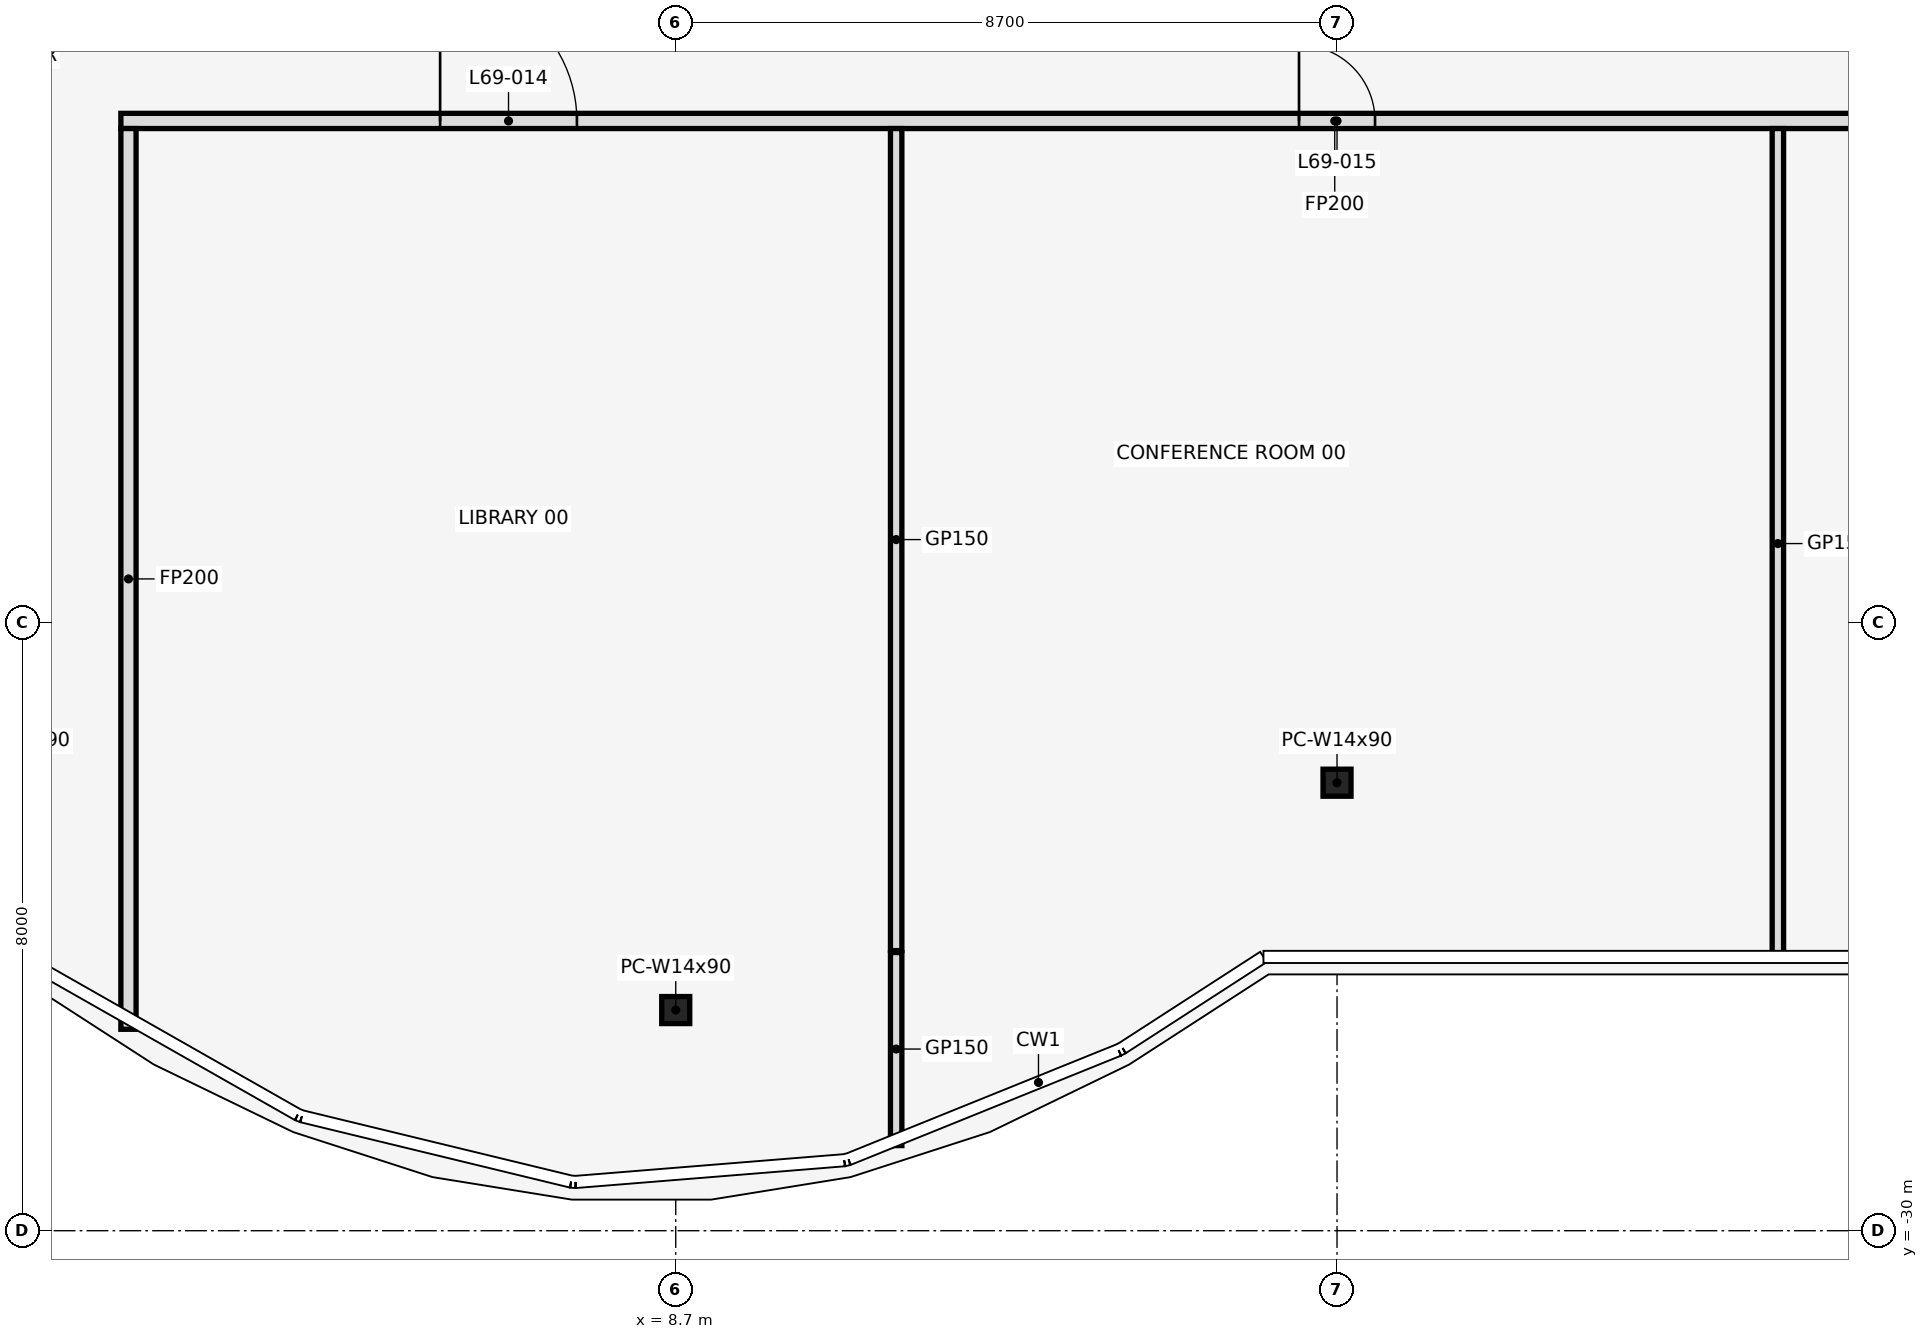
"""IFC4 building model, lengths in metres.
Left out: names, types, materials, properties, quantities, classifications, styles, units other than length and angle.
Written with IfcOpenShell. Run it as: python <this file> out.ifc"""

import sys

from ifc_helpers import new_model, si_unit, direction, frame, frame_2d, origin, origin_2d, place, context, subcontext, project, spatial, rectangle, i_section, extrude, element, fill, save


model = new_model("IFC4")
c1 = context("Model", 3, precision=1e-05, world=origin(), true_north=direction((0.0, 1.0)))
c2 = subcontext(c1, "Body", "Model", "MODEL_VIEW")
j1 = project(units=[si_unit("LENGTHUNIT", "METRE"), si_unit("PLANEANGLEUNIT", "RADIAN")], contexts=[c1])
p1 = place(None, origin())
s1 = spatial("IfcSite", under=j1, at=p1, CompositionType="ELEMENT")
p2 = place(p1, origin())
s2 = spatial("IfcBuilding", under=s1, at=p2, CompositionType="ELEMENT")
p3 = place(p2, frame((0.0, 0.0, 306.5)))
s3 = spatial("IfcBuildingStorey", under=s2, at=p3, CompositionType="ELEMENT", Elevation=306.5)
for number, where, z_axis, x_axis in (
    (1, (8.7, -27.097, 0.0), (0.0, 0.0, 1.0), (1.0, 0.0, 0.0)),
    (2, (17.4, -24.106, 0.0), (0.0, 0.0, 1.0), (1.0, 0.0, 0.0)),
):
    element("IfcColumn", number, at=place(p3, frame(where, z_axis=z_axis, x_axis=x_axis)), inside=s3, PredefinedType="COLUMN", context=c2, shape_type="SweptSolid", body=[
        extrude(i_section(OverallWidth=0.368, OverallDepth=0.356, WebThickness=0.011, FlangeThickness=0.018, at=origin_2d()), origin(), (0.0, 0.0, 1.0), 4.5),
    ])
p4 = place(p3, frame((1.4, -15.4, 0.0), z_axis=(0.0, 0.0, 1.0), x_axis=(1.0, 0.0, 0.0)))
e3 = element("IfcWall", 3, at=p4, inside=s3, PredefinedType="PARTITIONING", context=c2, shape_type="SweptSolid", body=[
    extrude(rectangle(XDim=31.94, YDim=0.2, at=frame_2d((15.97, 0.0))), origin(), (0.0, 0.0, 1.0), 3.418),
])
p5 = place(p4, frame((4.2, 0.0, 0.0)))
e4 = element("IfcOpeningElement", 4, at=p5, cuts=e3, PredefinedType="OPENING", context=c2, shape_type="SweptSolid", body=[
    extrude(rectangle(XDim=1.8, YDim=2.1, at=frame_2d((0.9, 1.05))), frame((0.0, 0.112, 0.0), z_axis=(0.0, -1.0, 0.0), x_axis=(1.0, 0.0, 0.0)), (0.0, 0.0, 1.0), 0.224),
])
p6 = place(p4, frame((15.5, 0.0, 0.0)))
e5 = element("IfcOpeningElement", 5, at=p6, cuts=e3, PredefinedType="OPENING", context=c2, shape_type="SweptSolid", body=[
    extrude(rectangle(XDim=1.0, YDim=2.1, at=frame_2d((0.5, 1.05))), frame((0.0, 0.112, 0.0), z_axis=(0.0, -1.0, 0.0), x_axis=(1.0, 0.0, 0.0)), (0.0, 0.0, 1.0), 0.224),
])
p7 = place(p4, frame((26.4, 0.0, 0.0)))
e6 = element("IfcOpeningElement", 6, at=p7, cuts=e3, PredefinedType="OPENING", context=c2, shape_type="SweptSolid", body=[
    extrude(rectangle(XDim=1.0, YDim=2.1, at=frame_2d((0.5, 1.05))), frame((0.0, 0.112, 0.0), z_axis=(0.0, -1.0, 0.0), x_axis=(1.0, 0.0, 0.0)), (0.0, 0.0, 1.0), 0.224),
])
p8 = place(p3, frame((1.5, -27.35, 0.0), z_axis=(0.0, 0.0, 1.0), x_axis=(0.0, 1.0, 0.0)))
e7 = element("IfcWall", 7, at=p8, inside=s3, PredefinedType="PARTITIONING", context=c2, shape_type="SweptSolid", body=[
    extrude(rectangle(XDim=11.85, YDim=0.2, at=frame_2d((5.925, 0.0))), origin(), (0.0, 0.0, 1.0), 3.418),
])
p9 = place(p3, frame((11.6, -28.88, 0.0), z_axis=(0.0, 0.0, 1.0), x_axis=(0.0, 1.0, 0.0)))
e8 = element("IfcWall", 8, at=p9, inside=s3, PredefinedType="PARTITIONING", context=c2, shape_type="SweptSolid", body=[
    extrude(rectangle(XDim=2.54, YDim=0.15, at=frame_2d((1.27, 0.0))), origin(), (0.0, 0.0, 1.0), 3.418),
])
p10 = place(p3, frame((11.6, -26.315, 0.0), z_axis=(0.0, 0.0, 1.0), x_axis=(0.0, 1.0, 0.0)))
e9 = element("IfcWall", 9, at=p10, inside=s3, PredefinedType="PARTITIONING", context=c2, shape_type="SweptSolid", body=[
    extrude(rectangle(XDim=10.815, YDim=0.15, at=frame_2d((5.408, 0.0))), origin(), (0.0, 0.0, 1.0), 3.418),
])
p11 = place(p3, frame((23.2, -26.42, 0.0), z_axis=(0.0, 0.0, 1.0), x_axis=(0.0, 1.0, 0.0)))
e10 = element("IfcWall", 10, at=p11, inside=s3, PredefinedType="PARTITIONING", context=c2, shape_type="SweptSolid", body=[
    extrude(rectangle(XDim=10.92, YDim=0.15, at=frame_2d((5.46, 0.0))), origin(), (0.0, 0.0, 1.0), 3.418),
])
p12 = place(p5, origin())
e11 = element("IfcDoor", 11, at=p12, inside=s3, OperationType="SINGLE_SWING_LEFT", PredefinedType="DOOR", context=c2, shape_type="SweptSolid", body=[
    extrude(rectangle(XDim=1.8, YDim=2.1, at=frame_2d((0.9, 1.05))), frame((0.0, 0.025, 0.0), z_axis=(0.0, -1.0, 0.0), x_axis=(1.0, 0.0, 0.0)), (0.0, 0.0, 1.0), 0.05),
])
fill(e4, e11)
p13 = place(p6, frame((1.0, 0.0, 0.0), z_axis=(0.0, 0.0, 1.0), x_axis=(-1.0, 0.0, 0.0)))
e12 = element("IfcDoor", 12, at=p13, inside=s3, OperationType="SINGLE_SWING_RIGHT", PredefinedType="DOOR", context=c2, shape_type="SweptSolid", body=[
    extrude(rectangle(XDim=1.0, YDim=2.1, at=frame_2d((0.5, 1.05))), frame((0.0, 0.025, 0.0), z_axis=(0.0, -1.0, 0.0), x_axis=(1.0, 0.0, 0.0)), (0.0, 0.0, 1.0), 0.05),
])
fill(e5, e12)
save(model, sys.argv[1])
